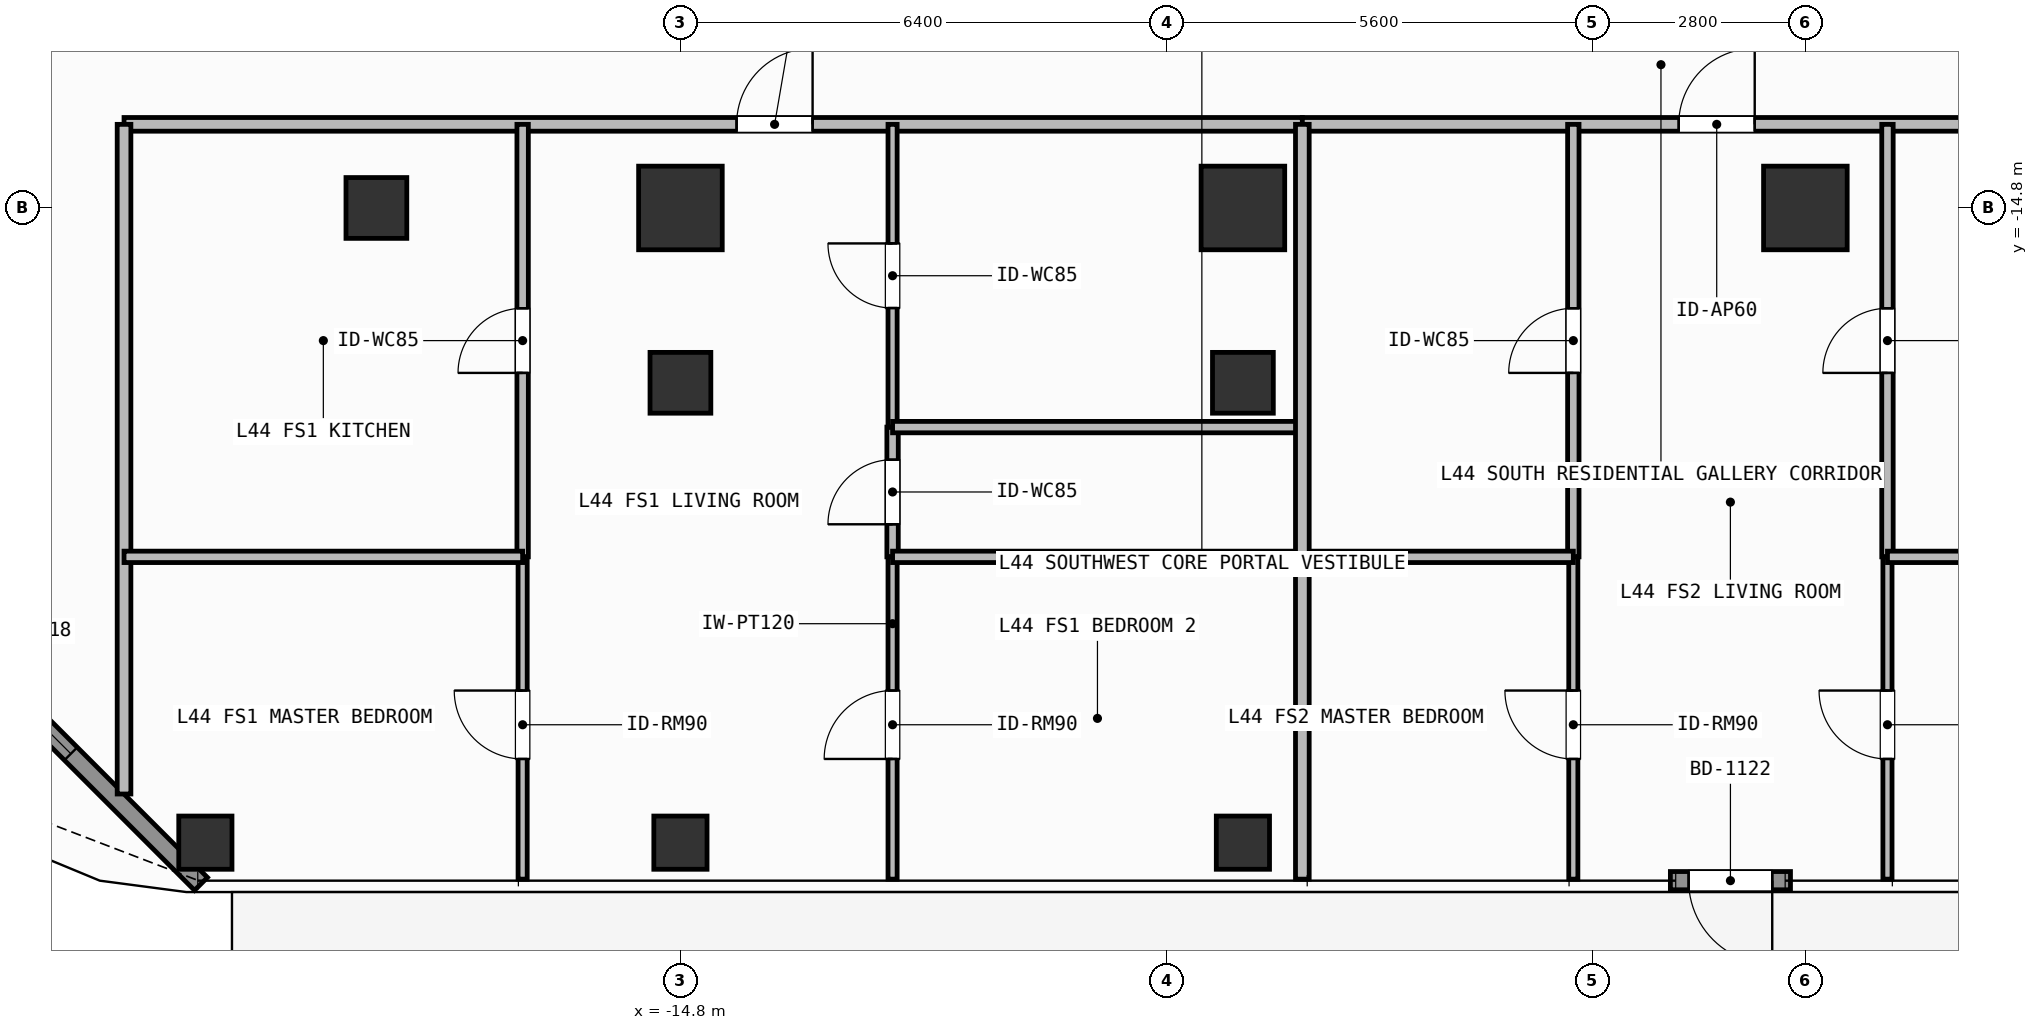
"""IFC4 building model, lengths in metres.
Left out: names, types, materials, properties, quantities, classifications, styles, units other than length and angle.
Written with IfcOpenShell. Run it as: python <this file> out.ifc"""

import sys

from ifc_helpers import new_model, si_unit, direction, frame, frame_2d, origin, origin_2d, place, context, subcontext, project, spatial, rectangle, hollow_rectangle, extrude, element, fill, save


model = new_model("IFC4")
c1 = context("Model", 3, precision=1e-05, world=origin(), true_north=direction((0.0, 1.0)))
c2 = subcontext(c1, "Body", "Model", "MODEL_VIEW")
j1 = project(units=[si_unit("LENGTHUNIT", "METRE"), si_unit("PLANEANGLEUNIT", "RADIAN")], contexts=[c1])
p1 = place(None, origin())
s1 = spatial("IfcSite", under=j1, at=p1, CompositionType="ELEMENT")
p2 = place(p1, origin())
s2 = spatial("IfcBuilding", under=s1, at=p2, CompositionType="ELEMENT")
p3 = place(p2, frame((0.0, 0.0, 179.7)))
s3 = spatial("IfcBuildingStorey", under=s2, at=p3, CompositionType="ELEMENT", Elevation=179.7)
for number, where, z_axis, x_axis in (
    (1, (-14.8, -14.8, 0.0), (0.0, 0.0, 1.0), (1.0, 0.0, 0.0)),
    (2, (-7.4, -14.8, 0.0), (0.0, 0.0, 1.0), (1.0, 0.0, 0.0)),
    (3, (0.0, -14.8, 0.0), (0.0, 0.0, 1.0), (1.0, 0.0, 0.0)),
):
    element("IfcColumn", number, at=place(p3, frame(where, z_axis=z_axis, x_axis=x_axis)), inside=s3, PredefinedType="COLUMN", context=c2, shape_type="SweptSolid", body=[
        extrude(rectangle(XDim=1.1, YDim=1.1, at=origin_2d()), origin(), (0.0, 0.0, 1.0), 3.9),
    ])
for number, where, z_axis, x_axis in (
    (4, (-18.8, -14.8, 0.0), (0.0, 0.0, 1.0), (1.0, 0.0, 0.0)),
    (5, (-14.8, -17.1, 0.0), (0.0, 0.0, 1.0), (1.0, 0.0, 0.0)),
    (6, (-7.4, -17.1, 0.0), (0.0, 0.0, 1.0), (1.0, 0.0, 0.0)),
):
    element("IfcColumn", number, at=place(p3, frame(where, z_axis=z_axis, x_axis=x_axis)), inside=s3, PredefinedType="COLUMN", context=c2, shape_type="SweptSolid", body=[
        extrude(hollow_rectangle(XDim=0.8, YDim=0.8, WallThickness=0.036, at=origin_2d()), origin(), (0.0, 0.0, 1.0), 3.9),
    ])
for number, where, z_axis, x_axis in (
    (7, (-21.05, -23.15, 0.0), (0.0, 0.0, 1.0), (1.0, 0.0, 0.0)),
    (8, (-14.8, -23.15, 0.0), (0.0, 0.0, 1.0), (1.0, 0.0, 0.0)),
    (9, (-7.4, -23.15, 0.0), (0.0, 0.0, 1.0), (1.0, 0.0, 0.0)),
):
    element("IfcColumn", number, at=place(p3, frame(where, z_axis=z_axis, x_axis=x_axis)), inside=s3, PredefinedType="COLUMN", context=c2, shape_type="SweptSolid", body=[
        extrude(hollow_rectangle(XDim=0.7, YDim=0.7, WallThickness=0.032, at=origin_2d()), origin(), (0.0, 0.0, 1.0), 3.9),
    ])
p4 = place(p3, frame((-0.196, -23.65, 0.0), z_axis=(0.0, 0.0, 1.0), x_axis=(-1.0, 0.0, 0.0)))
e10 = element("IfcWall", 10, at=p4, inside=s3, PredefinedType="SOLIDWALL", context=c2, shape_type="SweptSolid", body=[
    extrude(rectangle(XDim=1.58, YDim=0.24, at=frame_2d((0.79, 0.0))), origin(), (0.0, 0.0, 1.0), 3.68),
])
p5 = place(p4, frame((0.24, 0.0, 0.0)))
e11 = element("IfcOpeningElement", 11, at=p5, cuts=e10, PredefinedType="OPENING", context=c2, shape_type="SweptSolid", body=[
    extrude(rectangle(XDim=1.1, YDim=2.2, at=frame_2d((0.55, 1.1))), frame((0.0, 0.13, 0.0), z_axis=(0.0, -1.0, 0.0), x_axis=(1.0, 0.0, 0.0)), (0.0, 0.0, 1.0), 0.26),
])
p6 = place(p3, frame((-21.108, -23.692, 0.0), z_axis=(0.0, 0.0, 1.0), x_axis=(-0.707087534163, 0.707126027686, 0.0)))
e12 = element("IfcWall", 12, at=p6, inside=s3, PredefinedType="SOLIDWALL", context=c2, shape_type="SweptSolid", body=[
    extrude(rectangle(XDim=6.342, YDim=0.24, at=frame_2d((3.171, 0.0))), origin(), (0.0, 0.0, 1.0), 3.68),
])
p7 = place(p6, frame((2.421, 0.0, 0.8)))
e13 = element("IfcOpeningElement", 13, at=p7, cuts=e12, PredefinedType="OPENING", context=c2, shape_type="SweptSolid", body=[
    extrude(rectangle(XDim=1.5, YDim=1.85, at=frame_2d((0.75, 0.925))), frame((0.0, 0.13, 0.0), z_axis=(0.0, -1.0, 0.0), x_axis=(1.0, 0.0, 0.0)), (0.0, 0.0, 1.0), 0.26),
])
p8 = place(p3, frame((-22.12, -13.7, 0.0), z_axis=(0.0, 0.0, 1.0), x_axis=(1.0, 0.0, 0.0)))
e14 = element("IfcWall", 14, at=p8, inside=s3, PredefinedType="PARTITIONING", context=c2, shape_type="SweptSolid", body=[
    extrude(rectangle(XDim=15.502, YDim=0.18, at=frame_2d((7.751, 0.0))), origin(), (0.0, 0.0, 1.0), 3.68),
])
p9 = place(p8, frame((8.059, 0.0, 0.0)))
e15 = element("IfcOpeningElement", 15, at=p9, cuts=e14, PredefinedType="OPENING", context=c2, shape_type="SweptSolid", body=[
    extrude(rectangle(XDim=1.0, YDim=2.2, at=frame_2d((0.5, 1.1))), frame((0.0, 0.1, 0.0), z_axis=(0.0, -1.0, 0.0), x_axis=(1.0, 0.0, 0.0)), (0.0, 0.0, 1.0), 0.2),
])
p10 = place(p3, frame((-16.876, -19.39, 0.0), z_axis=(0.0, 0.0, 1.0), x_axis=(0.0, 1.0, 0.0)))
e16 = element("IfcWall", 16, at=p10, inside=s3, PredefinedType="PARTITIONING", context=c2, shape_type="SweptSolid", body=[
    extrude(rectangle(XDim=5.69, YDim=0.15, at=frame_2d((2.845, 0.0))), origin(), (0.0, 0.0, 1.0), 3.68),
])
p11 = place(p10, frame((2.42, 0.0, 0.0)))
e17 = element("IfcOpeningElement", 17, at=p11, cuts=e16, PredefinedType="OPENING", context=c2, shape_type="SweptSolid", body=[
    extrude(rectangle(XDim=0.85, YDim=2.1, at=frame_2d((0.425, 1.05))), frame((0.0, 0.085, 0.0), z_axis=(0.0, -1.0, 0.0), x_axis=(1.0, 0.0, 0.0)), (0.0, 0.0, 1.0), 0.17),
])
p12 = place(p3, frame((-16.876, -23.63, 0.0), z_axis=(0.0, 0.0, 1.0), x_axis=(0.0, 1.0, 0.0)))
e18 = element("IfcWall", 18, at=p12, inside=s3, PredefinedType="PARTITIONING", context=c2, shape_type="SweptSolid", body=[
    extrude(rectangle(XDim=4.24, YDim=0.12, at=frame_2d((2.12, 0.0))), origin(), (0.0, 0.0, 1.0), 3.68),
])
p13 = place(p12, frame((1.581, 0.0, 0.0)))
e19 = element("IfcOpeningElement", 19, at=p13, cuts=e18, PredefinedType="OPENING", context=c2, shape_type="SweptSolid", body=[
    extrude(rectangle(XDim=0.9, YDim=2.1, at=frame_2d((0.45, 1.05))), frame((0.0, 0.07, 0.0), z_axis=(0.0, -1.0, 0.0), x_axis=(1.0, 0.0, 0.0)), (0.0, 0.0, 1.0), 0.14),
])
p14 = place(p3, frame((-12.009, -19.39, 0.0), z_axis=(0.0, 0.0, 1.0), x_axis=(0.0, 1.0, 0.0)))
e20 = element("IfcWall", 20, at=p14, inside=s3, PredefinedType="PARTITIONING", context=c2, shape_type="SweptSolid", body=[
    extrude(rectangle(XDim=1.707, YDim=0.15, at=frame_2d((0.854, 0.0))), origin(), (0.0, 0.0, 1.0), 3.68),
])
p15 = place(p14, frame((0.428, 0.0, 0.0)))
e21 = element("IfcOpeningElement", 21, at=p15, cuts=e20, PredefinedType="OPENING", context=c2, shape_type="SweptSolid", body=[
    extrude(rectangle(XDim=0.85, YDim=2.1, at=frame_2d((0.425, 1.05))), frame((0.0, 0.085, 0.0), z_axis=(0.0, -1.0, 0.0), x_axis=(1.0, 0.0, 0.0)), (0.0, 0.0, 1.0), 0.17),
])
p16 = place(p3, frame((-12.009, -17.683, 0.0), z_axis=(0.0, 0.0, 1.0), x_axis=(0.0, 1.0, 0.0)))
e22 = element("IfcWall", 22, at=p16, inside=s3, PredefinedType="PARTITIONING", context=c2, shape_type="SweptSolid", body=[
    extrude(rectangle(XDim=3.983, YDim=0.12, at=frame_2d((1.992, 0.0))), origin(), (0.0, 0.0, 1.0), 3.68),
])
p17 = place(p16, frame((1.566, 0.0, 0.0)))
e23 = element("IfcOpeningElement", 23, at=p17, cuts=e22, PredefinedType="OPENING", context=c2, shape_type="SweptSolid", body=[
    extrude(rectangle(XDim=0.85, YDim=2.1, at=frame_2d((0.425, 1.05))), frame((0.0, 0.07, 0.0), z_axis=(0.0, -1.0, 0.0), x_axis=(1.0, 0.0, 0.0)), (0.0, 0.0, 1.0), 0.14),
])
p18 = place(p3, frame((-12.009, -23.63, 0.0), z_axis=(0.0, 0.0, 1.0), x_axis=(0.0, 1.0, 0.0)))
e24 = element("IfcWall", 24, at=p18, inside=s3, PredefinedType="PARTITIONING", context=c2, shape_type="SweptSolid", body=[
    extrude(rectangle(XDim=4.24, YDim=0.12, at=frame_2d((2.12, 0.0))), origin(), (0.0, 0.0, 1.0), 3.68),
])
p19 = place(p18, frame((1.581, 0.0, 0.0)))
e25 = element("IfcOpeningElement", 25, at=p19, cuts=e24, PredefinedType="OPENING", context=c2, shape_type="SweptSolid", body=[
    extrude(rectangle(XDim=0.9, YDim=2.1, at=frame_2d((0.45, 1.05))), frame((0.0, 0.07, 0.0), z_axis=(0.0, -1.0, 0.0), x_axis=(1.0, 0.0, 0.0)), (0.0, 0.0, 1.0), 0.14),
])
p20 = place(p3, frame((-6.618, -13.7, 0.0), z_axis=(0.0, 0.0, 1.0), x_axis=(1.0, 0.0, 0.0)))
e26 = element("IfcWall", 26, at=p20, inside=s3, PredefinedType="PARTITIONING", context=c2, shape_type="SweptSolid", body=[
    extrude(rectangle(XDim=10.548, YDim=0.18, at=frame_2d((5.274, 0.0))), origin(), (0.0, 0.0, 1.0), 3.68),
])
p21 = place(p20, frame((4.951, 0.0, 0.0)))
e27 = element("IfcOpeningElement", 27, at=p21, cuts=e26, PredefinedType="OPENING", context=c2, shape_type="SweptSolid", body=[
    extrude(rectangle(XDim=1.0, YDim=2.2, at=frame_2d((0.5, 1.1))), frame((0.0, 0.1, 0.0), z_axis=(0.0, -1.0, 0.0), x_axis=(1.0, 0.0, 0.0)), (0.0, 0.0, 1.0), 0.2),
])
p22 = place(p3, frame((-3.053, -19.39, 0.0), z_axis=(0.0, 0.0, 1.0), x_axis=(0.0, 1.0, 0.0)))
e28 = element("IfcWall", 28, at=p22, inside=s3, PredefinedType="PARTITIONING", context=c2, shape_type="SweptSolid", body=[
    extrude(rectangle(XDim=5.69, YDim=0.15, at=frame_2d((2.845, 0.0))), origin(), (0.0, 0.0, 1.0), 3.68),
])
p23 = place(p22, frame((2.42, 0.0, 0.0)))
e29 = element("IfcOpeningElement", 29, at=p23, cuts=e28, PredefinedType="OPENING", context=c2, shape_type="SweptSolid", body=[
    extrude(rectangle(XDim=0.85, YDim=2.1, at=frame_2d((0.425, 1.05))), frame((0.0, 0.085, 0.0), z_axis=(0.0, -1.0, 0.0), x_axis=(1.0, 0.0, 0.0)), (0.0, 0.0, 1.0), 0.17),
])
p24 = place(p3, frame((-3.053, -23.63, 0.0), z_axis=(0.0, 0.0, 1.0), x_axis=(0.0, 1.0, 0.0)))
e30 = element("IfcWall", 30, at=p24, inside=s3, PredefinedType="PARTITIONING", context=c2, shape_type="SweptSolid", body=[
    extrude(rectangle(XDim=4.24, YDim=0.12, at=frame_2d((2.12, 0.0))), origin(), (0.0, 0.0, 1.0), 3.68),
])
p25 = place(p24, frame((1.581, 0.0, 0.0)))
e31 = element("IfcOpeningElement", 31, at=p25, cuts=e30, PredefinedType="OPENING", context=c2, shape_type="SweptSolid", body=[
    extrude(rectangle(XDim=0.9, YDim=2.1, at=frame_2d((0.45, 1.05))), frame((0.0, 0.07, 0.0), z_axis=(0.0, -1.0, 0.0), x_axis=(1.0, 0.0, 0.0)), (0.0, 0.0, 1.0), 0.14),
])
p26 = place(p3, frame((1.08, -19.39, 0.0), z_axis=(0.0, 0.0, 1.0), x_axis=(0.0, 1.0, 0.0)))
e32 = element("IfcWall", 32, at=p26, inside=s3, PredefinedType="PARTITIONING", context=c2, shape_type="SweptSolid", body=[
    extrude(rectangle(XDim=5.69, YDim=0.15, at=frame_2d((2.845, 0.0))), origin(), (0.0, 0.0, 1.0), 3.68),
])
p27 = place(p26, frame((2.42, 0.0, 0.0)))
e33 = element("IfcOpeningElement", 33, at=p27, cuts=e32, PredefinedType="OPENING", context=c2, shape_type="SweptSolid", body=[
    extrude(rectangle(XDim=0.85, YDim=2.1, at=frame_2d((0.425, 1.05))), frame((0.0, 0.085, 0.0), z_axis=(0.0, -1.0, 0.0), x_axis=(1.0, 0.0, 0.0)), (0.0, 0.0, 1.0), 0.17),
])
p28 = place(p3, frame((1.08, -23.63, 0.0), z_axis=(0.0, 0.0, 1.0), x_axis=(0.0, 1.0, 0.0)))
e34 = element("IfcWall", 34, at=p28, inside=s3, PredefinedType="PARTITIONING", context=c2, shape_type="SweptSolid", body=[
    extrude(rectangle(XDim=4.24, YDim=0.12, at=frame_2d((2.12, 0.0))), origin(), (0.0, 0.0, 1.0), 3.68),
])
p29 = place(p28, frame((1.581, 0.0, 0.0)))
e35 = element("IfcOpeningElement", 35, at=p29, cuts=e34, PredefinedType="OPENING", context=c2, shape_type="SweptSolid", body=[
    extrude(rectangle(XDim=0.9, YDim=2.1, at=frame_2d((0.45, 1.05))), frame((0.0, 0.07, 0.0), z_axis=(0.0, -1.0, 0.0), x_axis=(1.0, 0.0, 0.0)), (0.0, 0.0, 1.0), 0.14),
])
p30 = place(p3, frame((-22.12, -22.51, 0.0), z_axis=(0.0, 0.0, 1.0), x_axis=(0.0, 1.0, 0.0)))
e36 = element("IfcWall", 36, at=p30, inside=s3, PredefinedType="PARTITIONING", context=c2, shape_type="SweptSolid", body=[
    extrude(rectangle(XDim=8.81, YDim=0.18, at=frame_2d((4.405, 0.0))), origin(), (0.0, 0.0, 1.0), 3.68),
])
p31 = place(p3, frame((-22.12, -19.39, 0.0), z_axis=(0.0, 0.0, 1.0), x_axis=(1.0, 0.0, 0.0)))
e37 = element("IfcWall", 37, at=p31, inside=s3, PredefinedType="PARTITIONING", context=c2, shape_type="SweptSolid", body=[
    extrude(rectangle(XDim=5.244, YDim=0.15, at=frame_2d((2.622, 0.0))), origin(), (0.0, 0.0, 1.0), 3.68),
])
for number, where, z_axis, x_axis in (
    (38, (-12.009, -17.683, 0.0), (0.0, 0.0, 1.0), (1.0, 0.0, 0.0)),
    (39, (-12.009, -19.39, 0.0), (0.0, 0.0, 1.0), (1.0, 0.0, 0.0)),
):
    element("IfcWall", number, at=place(p3, frame(where, z_axis=z_axis, x_axis=x_axis)), inside=s3, PredefinedType="PARTITIONING", context=c2, shape_type="SweptSolid", body=[
        extrude(rectangle(XDim=5.391, YDim=0.15, at=frame_2d((2.696, 0.0))), origin(), (0.0, 0.0, 1.0), 3.68),
    ])
p32 = place(p3, frame((-6.618, -19.39, 0.0), z_axis=(0.0, 0.0, 1.0), x_axis=(1.0, 0.0, 0.0)))
e40 = element("IfcWall", 40, at=p32, inside=s3, PredefinedType="PARTITIONING", context=c2, shape_type="SweptSolid", body=[
    extrude(rectangle(XDim=3.565, YDim=0.15, at=frame_2d((1.782, 0.0))), origin(), (0.0, 0.0, 1.0), 3.68),
])
p33 = place(p3, frame((1.08, -19.39, 0.0), z_axis=(0.0, 0.0, 1.0), x_axis=(1.0, 0.0, 0.0)))
e41 = element("IfcWall", 41, at=p33, inside=s3, PredefinedType="PARTITIONING", context=c2, shape_type="SweptSolid", body=[
    extrude(rectangle(XDim=2.85, YDim=0.15, at=frame_2d((1.425, 0.0))), origin(), (0.0, 0.0, 1.0), 3.68),
])
p34 = place(p3, frame((-6.618, -23.63, 0.0), z_axis=(0.0, 0.0, 1.0), x_axis=(0.0, 1.0, 0.0)))
e42 = element("IfcWall", 42, at=p34, inside=s3, PredefinedType="PARTITIONING", context=c2, shape_type="SweptSolid", body=[
    extrude(rectangle(XDim=9.93, YDim=0.18, at=frame_2d((4.965, 0.0))), origin(), (0.0, 0.0, 1.0), 3.68),
])
p35 = place(p5, origin())
e43 = element("IfcDoor", 43, at=p35, inside=s3, OperationType="SINGLE_SWING_LEFT", PredefinedType="DOOR", context=c2, shape_type="SweptSolid", body=[
    extrude(rectangle(XDim=1.1, YDim=2.2, at=frame_2d((0.55, 1.1))), frame((0.0, 0.025, 0.0), z_axis=(0.0, -1.0, 0.0), x_axis=(1.0, 0.0, 0.0)), (0.0, 0.0, 1.0), 0.05),
])
fill(e11, e43)
p36 = place(p7, origin())
e44 = element("IfcWindow", 44, at=p36, inside=s3, PartitioningType="SINGLE_PANEL", PredefinedType="WINDOW", context=c2, shape_type="SweptSolid", body=[
    extrude(rectangle(XDim=1.5, YDim=1.85, at=frame_2d((0.75, 0.925))), frame((0.0, 0.03, 0.0), z_axis=(0.0, -1.0, 0.0), x_axis=(1.0, 0.0, 0.0)), (0.0, 0.0, 1.0), 0.06),
])
fill(e13, e44)
p37 = place(p9, origin())
e45 = element("IfcDoor", 45, at=p37, inside=s3, OperationType="SINGLE_SWING_RIGHT", PredefinedType="DOOR", context=c2, shape_type="SweptSolid", body=[
    extrude(rectangle(XDim=1.0, YDim=2.2, at=frame_2d((0.5, 1.1))), frame((0.0, 0.025, 0.0), z_axis=(0.0, -1.0, 0.0), x_axis=(1.0, 0.0, 0.0)), (0.0, 0.0, 1.0), 0.05),
])
fill(e15, e45)
p38 = place(p11, origin())
e46 = element("IfcDoor", 46, at=p38, inside=s3, OperationType="SINGLE_SWING_LEFT", PredefinedType="DOOR", context=c2, shape_type="SweptSolid", body=[
    extrude(rectangle(XDim=0.85, YDim=2.1, at=frame_2d((0.425, 1.05))), frame((0.0, 0.025, 0.0), z_axis=(0.0, -1.0, 0.0), x_axis=(1.0, 0.0, 0.0)), (0.0, 0.0, 1.0), 0.05),
])
fill(e17, e46)
p39 = place(p13, origin())
e47 = element("IfcDoor", 47, at=p39, inside=s3, OperationType="SINGLE_SWING_RIGHT", PredefinedType="DOOR", context=c2, shape_type="SweptSolid", body=[
    extrude(rectangle(XDim=0.9, YDim=2.1, at=frame_2d((0.45, 1.05))), frame((0.0, 0.025, 0.0), z_axis=(0.0, -1.0, 0.0), x_axis=(1.0, 0.0, 0.0)), (0.0, 0.0, 1.0), 0.05),
])
fill(e19, e47)
p40 = place(p15, origin())
e48 = element("IfcDoor", 48, at=p40, inside=s3, OperationType="SINGLE_SWING_LEFT", PredefinedType="DOOR", context=c2, shape_type="SweptSolid", body=[
    extrude(rectangle(XDim=0.85, YDim=2.1, at=frame_2d((0.425, 1.05))), frame((0.0, 0.025, 0.0), z_axis=(0.0, -1.0, 0.0), x_axis=(1.0, 0.0, 0.0)), (0.0, 0.0, 1.0), 0.05),
])
fill(e21, e48)
p41 = place(p17, origin())
e49 = element("IfcDoor", 49, at=p41, inside=s3, OperationType="SINGLE_SWING_RIGHT", PredefinedType="DOOR", context=c2, shape_type="SweptSolid", body=[
    extrude(rectangle(XDim=0.85, YDim=2.1, at=frame_2d((0.425, 1.05))), frame((0.0, 0.025, 0.0), z_axis=(0.0, -1.0, 0.0), x_axis=(1.0, 0.0, 0.0)), (0.0, 0.0, 1.0), 0.05),
])
fill(e23, e49)
p42 = place(p19, origin())
e50 = element("IfcDoor", 50, at=p42, inside=s3, OperationType="SINGLE_SWING_LEFT", PredefinedType="DOOR", context=c2, shape_type="SweptSolid", body=[
    extrude(rectangle(XDim=0.9, YDim=2.1, at=frame_2d((0.45, 1.05))), frame((0.0, 0.025, 0.0), z_axis=(0.0, -1.0, 0.0), x_axis=(1.0, 0.0, 0.0)), (0.0, 0.0, 1.0), 0.05),
])
fill(e25, e50)
p43 = place(p21, origin())
e51 = element("IfcDoor", 51, at=p43, inside=s3, OperationType="SINGLE_SWING_RIGHT", PredefinedType="DOOR", context=c2, shape_type="SweptSolid", body=[
    extrude(rectangle(XDim=1.0, YDim=2.2, at=frame_2d((0.5, 1.1))), frame((0.0, 0.025, 0.0), z_axis=(0.0, -1.0, 0.0), x_axis=(1.0, 0.0, 0.0)), (0.0, 0.0, 1.0), 0.05),
])
fill(e27, e51)
p44 = place(p23, origin())
e52 = element("IfcDoor", 52, at=p44, inside=s3, OperationType="SINGLE_SWING_LEFT", PredefinedType="DOOR", context=c2, shape_type="SweptSolid", body=[
    extrude(rectangle(XDim=0.85, YDim=2.1, at=frame_2d((0.425, 1.05))), frame((0.0, 0.025, 0.0), z_axis=(0.0, -1.0, 0.0), x_axis=(1.0, 0.0, 0.0)), (0.0, 0.0, 1.0), 0.05),
])
fill(e29, e52)
p45 = place(p25, origin())
e53 = element("IfcDoor", 53, at=p45, inside=s3, OperationType="SINGLE_SWING_RIGHT", PredefinedType="DOOR", context=c2, shape_type="SweptSolid", body=[
    extrude(rectangle(XDim=0.9, YDim=2.1, at=frame_2d((0.45, 1.05))), frame((0.0, 0.025, 0.0), z_axis=(0.0, -1.0, 0.0), x_axis=(1.0, 0.0, 0.0)), (0.0, 0.0, 1.0), 0.05),
])
fill(e31, e53)
p46 = place(p27, origin())
e54 = element("IfcDoor", 54, at=p46, inside=s3, OperationType="SINGLE_SWING_LEFT", PredefinedType="DOOR", context=c2, shape_type="SweptSolid", body=[
    extrude(rectangle(XDim=0.85, YDim=2.1, at=frame_2d((0.425, 1.05))), frame((0.0, 0.025, 0.0), z_axis=(0.0, -1.0, 0.0), x_axis=(1.0, 0.0, 0.0)), (0.0, 0.0, 1.0), 0.05),
])
fill(e33, e54)
p47 = place(p29, origin())
e55 = element("IfcDoor", 55, at=p47, inside=s3, OperationType="SINGLE_SWING_RIGHT", PredefinedType="DOOR", context=c2, shape_type="SweptSolid", body=[
    extrude(rectangle(XDim=0.9, YDim=2.1, at=frame_2d((0.45, 1.05))), frame((0.0, 0.025, 0.0), z_axis=(0.0, -1.0, 0.0), x_axis=(1.0, 0.0, 0.0)), (0.0, 0.0, 1.0), 0.05),
])
fill(e35, e55)
save(model, sys.argv[1])
